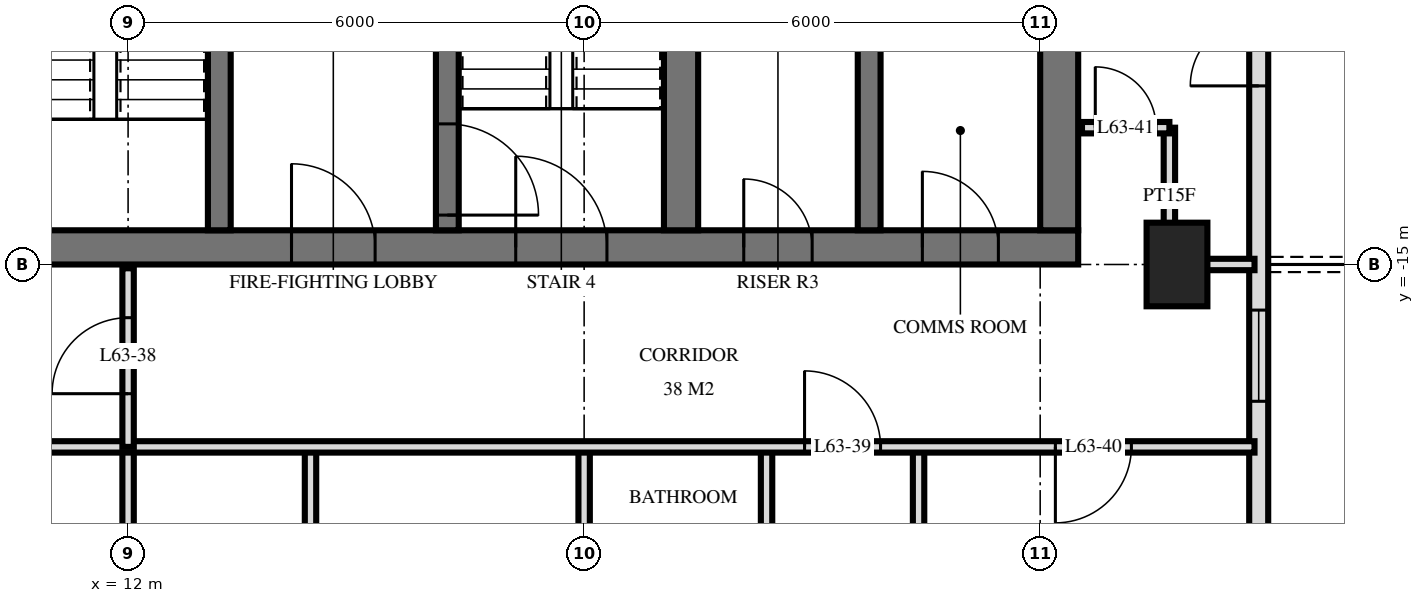
"""IFC4 building model, lengths in metres.
Left out: names, types, materials, properties, quantities, classifications, styles, units other than length and angle.
Written with IfcOpenShell. Run it as: python <this file> out.ifc"""

import sys

from ifc_helpers import new_model, si_unit, direction, frame, frame_2d, origin, origin_2d, place, context, subcontext, project, spatial, rectangle, extrude, element, fill, save


model = new_model("IFC4")
c1 = context("Model", 3, precision=1e-05, world=origin(), true_north=direction((0.0, 1.0)))
c2 = subcontext(c1, "Body", "Model", "MODEL_VIEW")
j1 = project(units=[si_unit("LENGTHUNIT", "METRE"), si_unit("PLANEANGLEUNIT", "RADIAN")], contexts=[c1])
p1 = place(None, origin())
s1 = spatial("IfcSite", under=j1, at=p1, CompositionType="ELEMENT")
p2 = place(p1, origin())
s2 = spatial("IfcBuilding", under=s1, at=p2, CompositionType="ELEMENT")
p3 = place(p2, frame((0.0, 0.0, 239.6)))
s3 = spatial("IfcBuildingStorey", under=s2, at=p3, CompositionType="ELEMENT", Elevation=239.6)
p4 = place(p3, frame((25.8, -15.0, 0.0), z_axis=(0.0, 0.0, 1.0), x_axis=(0.0, 1.0, 0.0)))
e1 = element("IfcColumn", 1, at=p4, inside=s3, PredefinedType="COLUMN", context=c2, shape_type="SweptSolid", body=[
    extrude(rectangle(XDim=1.1, YDim=0.8, at=origin_2d()), origin(), (0.0, 0.0, 1.0), 3.5),
])
p5 = place(p3, frame((10.0, -14.775, 0.0), z_axis=(0.0, 0.0, 1.0), x_axis=(1.0, 0.0, 0.0)))
e2 = element("IfcWall", 2, at=p5, inside=s3, PredefinedType="SHEAR", context=c2, shape_type="SweptSolid", body=[
    extrude(rectangle(XDim=14.5, YDim=0.45, at=frame_2d((7.25, 0.0))), origin(), (0.0, 0.0, 1.0), 3.5),
])
p6 = place(p5, frame((7.1, 0.0, 0.0)))
e3 = element("IfcOpeningElement", 3, at=p6, cuts=e2, PredefinedType="OPENING", context=c2, shape_type="SweptSolid", body=[
    extrude(rectangle(XDim=1.2, YDim=2.1, at=frame_2d((0.6, 1.05))), frame((0.0, 0.235, 0.0), z_axis=(0.0, -1.0, 0.0), x_axis=(1.0, 0.0, 0.0)), (0.0, 0.0, 1.0), 0.47),
])
p7 = place(p5, frame((4.15, 0.0, 0.0)))
e4 = element("IfcOpeningElement", 4, at=p7, cuts=e2, PredefinedType="OPENING", context=c2, shape_type="SweptSolid", body=[
    extrude(rectangle(XDim=1.1, YDim=2.1, at=frame_2d((0.55, 1.05))), frame((0.0, 0.235, 0.0), z_axis=(0.0, -1.0, 0.0), x_axis=(1.0, 0.0, 0.0)), (0.0, 0.0, 1.0), 0.47),
])
p8 = place(p5, frame((10.1, 0.0, 0.0)))
e5 = element("IfcOpeningElement", 5, at=p8, cuts=e2, PredefinedType="OPENING", context=c2, shape_type="SweptSolid", body=[
    extrude(rectangle(XDim=0.9, YDim=2.1, at=frame_2d((0.45, 1.05))), frame((0.0, 0.235, 0.0), z_axis=(0.0, -1.0, 0.0), x_axis=(1.0, 0.0, 0.0)), (0.0, 0.0, 1.0), 0.47),
])
p9 = place(p5, frame((12.45, 0.0, 0.0)))
e6 = element("IfcOpeningElement", 6, at=p9, cuts=e2, PredefinedType="OPENING", context=c2, shape_type="SweptSolid", body=[
    extrude(rectangle(XDim=1.0, YDim=2.1, at=frame_2d((0.5, 1.05))), frame((0.0, 0.235, 0.0), z_axis=(0.0, -1.0, 0.0), x_axis=(1.0, 0.0, 0.0)), (0.0, 0.0, 1.0), 0.47),
])
p10 = place(p3, frame((24.25, -14.55, 0.0), z_axis=(0.0, 0.0, 1.0), x_axis=(0.0, 1.0, 0.0)))
e7 = element("IfcWall", 7, at=p10, inside=s3, PredefinedType="SHEAR", context=c2, shape_type="SweptSolid", body=[
    extrude(rectangle(XDim=14.1, YDim=0.5, at=frame_2d((7.05, 0.0))), origin(), (0.0, 0.0, 1.0), 3.5),
])
p11 = place(p3, frame((13.2, -14.55, 0.0), z_axis=(0.0, 0.0, 1.0), x_axis=(0.0, 1.0, 0.0)))
e8 = element("IfcWall", 8, at=p11, inside=s3, PredefinedType="SHEAR", context=c2, shape_type="SweptSolid", body=[
    extrude(rectangle(XDim=5.4, YDim=0.3, at=frame_2d((2.7, 0.0))), origin(), (0.0, 0.0, 1.0), 3.5),
])
p12 = place(p11, frame((4.0, 0.0, 0.0)))
e9 = element("IfcOpeningElement", 9, at=p12, cuts=e8, PredefinedType="OPENING", context=c2, shape_type="SweptSolid", body=[
    extrude(rectangle(XDim=1.2, YDim=2.1, at=frame_2d((0.6, 1.05))), frame((0.0, 0.16, 0.0), z_axis=(0.0, -1.0, 0.0), x_axis=(1.0, 0.0, 0.0)), (0.0, 0.0, 1.0), 0.32),
])
p13 = place(p3, frame((16.2, -14.55, 0.0), z_axis=(0.0, 0.0, 1.0), x_axis=(0.0, 1.0, 0.0)))
e10 = element("IfcWall", 10, at=p13, inside=s3, PredefinedType="SHEAR", context=c2, shape_type="SweptSolid", body=[
    extrude(rectangle(XDim=5.4, YDim=0.3, at=frame_2d((2.7, 0.0))), origin(), (0.0, 0.0, 1.0), 3.5),
])
p14 = place(p13, frame((0.2, 0.0, 0.0)))
e11 = element("IfcOpeningElement", 11, at=p14, cuts=e10, PredefinedType="OPENING", context=c2, shape_type="SweptSolid", body=[
    extrude(rectangle(XDim=1.2, YDim=2.1, at=frame_2d((0.6, 1.05))), frame((0.0, 0.16, 0.0), z_axis=(0.0, -1.0, 0.0), x_axis=(1.0, 0.0, 0.0)), (0.0, 0.0, 1.0), 0.32),
])
p15 = place(p3, frame((19.275, -14.55, 0.0), z_axis=(0.0, 0.0, 1.0), x_axis=(0.0, 1.0, 0.0)))
e12 = element("IfcWall", 12, at=p15, inside=s3, PredefinedType="SHEAR", context=c2, shape_type="SweptSolid", body=[
    extrude(rectangle(XDim=5.4, YDim=0.45, at=frame_2d((2.7, 0.0))), origin(), (0.0, 0.0, 1.0), 3.5),
])
p16 = place(p3, frame((21.75, -14.55, 0.0), z_axis=(0.0, 0.0, 1.0), x_axis=(0.0, 1.0, 0.0)))
e13 = element("IfcWall", 13, at=p16, inside=s3, PredefinedType="SHEAR", context=c2, shape_type="SweptSolid", body=[
    extrude(rectangle(XDim=5.4, YDim=0.3, at=frame_2d((2.7, 0.0))), origin(), (0.0, 0.0, 1.0), 3.5),
])
p17 = place(p3, frame((26.875, -24.875, 0.0), z_axis=(0.0, 0.0, 1.0), x_axis=(0.0, 1.0, 0.0)))
e14 = element("IfcWall", 14, at=p17, inside=s3, PredefinedType="SOLIDWALL", context=c2, shape_type="SweptSolid", body=[
    extrude(rectangle(XDim=21.551, YDim=0.25, at=frame_2d((10.775, 0.0))), origin(), (0.0, 0.0, 1.0), 3.22),
])
p18 = place(p17, frame((0.575, 0.0, 0.0)))
e15 = element("IfcOpeningElement", 15, at=p18, cuts=e14, PredefinedType="OPENING", context=c2, shape_type="SweptSolid", body=[
    extrude(rectangle(XDim=1.8, YDim=2.4, at=frame_2d((0.9, 1.2))), frame((0.0, 0.135, 0.0), z_axis=(0.0, -1.0, 0.0), x_axis=(1.0, 0.0, 0.0)), (0.0, 0.0, 1.0), 0.27),
])
p19 = place(p17, frame((4.475, 0.0, 0.0)))
e16 = element("IfcOpeningElement", 16, at=p19, cuts=e14, PredefinedType="OPENING", context=c2, shape_type="SweptSolid", body=[
    extrude(rectangle(XDim=1.8, YDim=2.4, at=frame_2d((0.9, 1.2))), frame((0.0, 0.135, 0.0), z_axis=(0.0, -1.0, 0.0), x_axis=(1.0, 0.0, 0.0)), (0.0, 0.0, 1.0), 0.27),
])
p20 = place(p17, frame((8.075, 0.0, 0.9)))
e17 = element("IfcOpeningElement", 17, at=p20, cuts=e14, PredefinedType="OPENING", context=c2, shape_type="SweptSolid", body=[
    extrude(rectangle(XDim=1.2, YDim=1.5, at=frame_2d((0.6, 0.75))), frame((0.0, 0.135, 0.0), z_axis=(0.0, -1.0, 0.0), x_axis=(1.0, 0.0, 0.0)), (0.0, 0.0, 1.0), 0.27),
])
p21 = place(p17, frame((12.225, 0.0, 0.0)))
e18 = element("IfcOpeningElement", 18, at=p21, cuts=e14, PredefinedType="OPENING", context=c2, shape_type="SweptSolid", body=[
    extrude(rectangle(XDim=1.8, YDim=2.4, at=frame_2d((0.9, 1.2))), frame((0.0, 0.135, 0.0), z_axis=(0.0, -1.0, 0.0), x_axis=(1.0, 0.0, 0.0)), (0.0, 0.0, 1.0), 0.27),
])
p22 = place(p3, frame((25.7, -15.0, 0.0), z_axis=(0.0, 0.0, 1.0), x_axis=(0.0, 1.0, 0.0)))
e19 = element("IfcWall", 19, at=p22, inside=s3, PredefinedType="PARTITIONING", context=c2, shape_type="SweptSolid", body=[
    extrude(rectangle(XDim=1.8, YDim=0.15, at=frame_2d((0.9, 0.0))), origin(), (0.0, 0.0, 1.0), 3.22),
])
p23 = place(p3, frame((22.4, -21.6, 0.0), z_axis=(0.0, 0.0, 1.0), x_axis=(0.0, 1.0, 0.0)))
e20 = element("IfcWall", 20, at=p23, inside=s3, PredefinedType="PARTITIONING", context=c2, shape_type="SweptSolid", body=[
    extrude(rectangle(XDim=4.2, YDim=0.15, at=frame_2d((2.1, 0.0))), origin(), (0.0, 0.0, 1.0), 3.22),
])
p24 = place(p3, frame((20.4, -21.6, 0.0), z_axis=(0.0, 0.0, 1.0), x_axis=(0.0, 1.0, 0.0)))
e21 = element("IfcWall", 21, at=p24, inside=s3, PredefinedType="PARTITIONING", context=c2, shape_type="SweptSolid", body=[
    extrude(rectangle(XDim=4.2, YDim=0.15, at=frame_2d((2.1, 0.0))), origin(), (0.0, 0.0, 1.0), 3.22),
])
p25 = place(p24, frame((1.6, 0.0, 0.0)))
e22 = element("IfcOpeningElement", 22, at=p25, cuts=e21, PredefinedType="OPENING", context=c2, shape_type="SweptSolid", body=[
    extrude(rectangle(XDim=1.0, YDim=2.1, at=frame_2d((0.5, 1.05))), frame((0.0, 0.085, 0.0), z_axis=(0.0, -1.0, 0.0), x_axis=(1.0, 0.0, 0.0)), (0.0, 0.0, 1.0), 0.17),
])
for number, where, z_axis, x_axis in (
    (23, (18.0, -21.6, 0.0), (0.0, 0.0, 1.0), (0.0, 1.0, 0.0)),
    (24, (14.4, -21.6, 0.0), (0.0, 0.0, 1.0), (0.0, 1.0, 0.0)),
):
    element("IfcWall", number, at=place(p3, frame(where, z_axis=z_axis, x_axis=x_axis)), inside=s3, PredefinedType="PARTITIONING", context=c2, shape_type="SweptSolid", body=[
        extrude(rectangle(XDim=4.2, YDim=0.15, at=frame_2d((2.1, 0.0))), origin(), (0.0, 0.0, 1.0), 3.22),
    ])
p26 = place(p3, frame((12.0, -17.4, 0.0), z_axis=(0.0, 0.0, 1.0), x_axis=(0.0, 1.0, 0.0)))
e25 = element("IfcWall", 25, at=p26, inside=s3, PredefinedType="PARTITIONING", context=c2, shape_type="SweptSolid", body=[
    extrude(rectangle(XDim=2.35, YDim=0.15, at=frame_2d((1.175, 0.0))), origin(), (0.0, 0.0, 1.0), 3.22),
])
p27 = place(p26, frame((0.7, 0.0, 0.0)))
e26 = element("IfcOpeningElement", 26, at=p27, cuts=e25, PredefinedType="OPENING", context=c2, shape_type="SweptSolid", body=[
    extrude(rectangle(XDim=1.0, YDim=2.1, at=frame_2d((0.5, 1.05))), frame((0.0, 0.085, 0.0), z_axis=(0.0, -1.0, 0.0), x_axis=(1.0, 0.0, 0.0)), (0.0, 0.0, 1.0), 0.17),
])
p28 = place(p3, frame((12.0, -29.22, 0.0), z_axis=(0.0, 0.0, 1.0), x_axis=(0.0, 1.0, 0.0)))
e27 = element("IfcWall", 27, at=p28, inside=s3, PredefinedType="PARTITIONING", context=c2, shape_type="SweptSolid", body=[
    extrude(rectangle(XDim=11.82, YDim=0.15, at=frame_2d((5.91, 0.0))), origin(), (0.0, 0.0, 1.0), 3.22),
])
p29 = place(p3, frame((-26.82, -17.4, 0.0), z_axis=(0.0, 0.0, 1.0), x_axis=(1.0, 0.0, 0.0)))
e28 = element("IfcWall", 28, at=p29, inside=s3, PredefinedType="PARTITIONING", context=c2, shape_type="SweptSolid", body=[
    extrude(rectangle(XDim=53.64, YDim=0.15, at=frame_2d((26.82, 0.0))), origin(), (0.0, 0.0, 1.0), 3.22),
])
p30 = place(p29, frame((11.97, 0.0, 0.0)))
e29 = element("IfcOpeningElement", 29, at=p30, cuts=e28, PredefinedType="OPENING", context=c2, shape_type="SweptSolid", body=[
    extrude(rectangle(XDim=1.0, YDim=2.1, at=frame_2d((0.5, 1.05))), frame((0.0, 0.085, 0.0), z_axis=(0.0, -1.0, 0.0), x_axis=(1.0, 0.0, 0.0)), (0.0, 0.0, 1.0), 0.17),
])
p31 = place(p29, frame((3.92, 0.0, 0.0)))
e30 = element("IfcOpeningElement", 30, at=p31, cuts=e28, PredefinedType="OPENING", context=c2, shape_type="SweptSolid", body=[
    extrude(rectangle(XDim=1.0, YDim=2.1, at=frame_2d((0.5, 1.05))), frame((0.0, 0.085, 0.0), z_axis=(0.0, -1.0, 0.0), x_axis=(1.0, 0.0, 0.0)), (0.0, 0.0, 1.0), 0.17),
])
p32 = place(p29, frame((5.72, 0.0, 0.0)))
e31 = element("IfcOpeningElement", 31, at=p32, cuts=e28, PredefinedType="OPENING", context=c2, shape_type="SweptSolid", body=[
    extrude(rectangle(XDim=1.0, YDim=2.1, at=frame_2d((0.5, 1.05))), frame((0.0, 0.085, 0.0), z_axis=(0.0, -1.0, 0.0), x_axis=(1.0, 0.0, 0.0)), (0.0, 0.0, 1.0), 0.17),
])
p33 = place(p29, frame((47.72, 0.0, 0.0)))
e32 = element("IfcOpeningElement", 32, at=p33, cuts=e28, PredefinedType="OPENING", context=c2, shape_type="SweptSolid", body=[
    extrude(rectangle(XDim=1.0, YDim=2.1, at=frame_2d((0.5, 1.05))), frame((0.0, 0.085, 0.0), z_axis=(0.0, -1.0, 0.0), x_axis=(1.0, 0.0, 0.0)), (0.0, 0.0, 1.0), 0.17),
])
p34 = place(p29, frame((51.02, 0.0, 0.0)))
e33 = element("IfcOpeningElement", 33, at=p34, cuts=e28, PredefinedType="OPENING", context=c2, shape_type="SweptSolid", body=[
    extrude(rectangle(XDim=1.0, YDim=2.1, at=frame_2d((0.5, 1.05))), frame((0.0, 0.085, 0.0), z_axis=(0.0, -1.0, 0.0), x_axis=(1.0, 0.0, 0.0)), (0.0, 0.0, 1.0), 0.17),
])
p35 = place(p29, frame((17.32, 0.0, 0.0)))
e34 = element("IfcOpeningElement", 34, at=p35, cuts=e28, PredefinedType="OPENING", context=c2, shape_type="SweptSolid", body=[
    extrude(rectangle(XDim=1.0, YDim=2.1, at=frame_2d((0.5, 1.05))), frame((0.0, 0.085, 0.0), z_axis=(0.0, -1.0, 0.0), x_axis=(1.0, 0.0, 0.0)), (0.0, 0.0, 1.0), 0.17),
])
p36 = place(p29, frame((23.32, 0.0, 0.0)))
e35 = element("IfcOpeningElement", 35, at=p36, cuts=e28, PredefinedType="OPENING", context=c2, shape_type="SweptSolid", body=[
    extrude(rectangle(XDim=1.0, YDim=2.1, at=frame_2d((0.5, 1.05))), frame((0.0, 0.085, 0.0), z_axis=(0.0, -1.0, 0.0), x_axis=(1.0, 0.0, 0.0)), (0.0, 0.0, 1.0), 0.17),
])
p37 = place(p29, frame((29.32, 0.0, 0.0)))
e36 = element("IfcOpeningElement", 36, at=p37, cuts=e28, PredefinedType="OPENING", context=c2, shape_type="SweptSolid", body=[
    extrude(rectangle(XDim=1.0, YDim=2.1, at=frame_2d((0.5, 1.05))), frame((0.0, 0.085, 0.0), z_axis=(0.0, -1.0, 0.0), x_axis=(1.0, 0.0, 0.0)), (0.0, 0.0, 1.0), 0.17),
])
p38 = place(p29, frame((35.32, 0.0, 0.0)))
e37 = element("IfcOpeningElement", 37, at=p38, cuts=e28, PredefinedType="OPENING", context=c2, shape_type="SweptSolid", body=[
    extrude(rectangle(XDim=1.0, YDim=2.1, at=frame_2d((0.5, 1.05))), frame((0.0, 0.085, 0.0), z_axis=(0.0, -1.0, 0.0), x_axis=(1.0, 0.0, 0.0)), (0.0, 0.0, 1.0), 0.17),
])
p39 = place(p3, frame((25.7, -15.0, 0.0), z_axis=(0.0, 0.0, 1.0), x_axis=(1.0, 0.0, 0.0)))
e38 = element("IfcWall", 38, at=p39, inside=s3, PredefinedType="PARTITIONING", context=c2, shape_type="SweptSolid", body=[
    extrude(rectangle(XDim=1.12, YDim=0.15, at=frame_2d((0.56, 0.0))), origin(), (0.0, 0.0, 1.0), 3.22),
])
p40 = place(p3, frame((24.55, -13.2, 0.0), z_axis=(0.0, 0.0, 1.0), x_axis=(1.0, 0.0, 0.0)))
e39 = element("IfcWall", 39, at=p40, inside=s3, PredefinedType="PARTITIONING", context=c2, shape_type="SweptSolid", body=[
    extrude(rectangle(XDim=1.15, YDim=0.15, at=frame_2d((0.575, 0.0))), origin(), (0.0, 0.0, 1.0), 3.22),
])
p41 = place(p40, frame((0.175, 0.0, 0.0)))
e40 = element("IfcOpeningElement", 40, at=p41, cuts=e39, PredefinedType="OPENING", context=c2, shape_type="SweptSolid", body=[
    extrude(rectangle(XDim=0.8, YDim=2.1, at=frame_2d((0.4, 1.05))), frame((0.0, 0.085, 0.0), z_axis=(0.0, -1.0, 0.0), x_axis=(1.0, 0.0, 0.0)), (0.0, 0.0, 1.0), 0.17),
])
p42 = place(p20, origin())
e41 = element("IfcWindow", 41, at=p42, inside=s3, PartitioningType="SINGLE_PANEL", PredefinedType="WINDOW", context=c2, shape_type="SweptSolid", body=[
    extrude(rectangle(XDim=1.2, YDim=1.5, at=frame_2d((0.6, 0.75))), frame((0.0, 0.03, 0.0), z_axis=(0.0, -1.0, 0.0), x_axis=(1.0, 0.0, 0.0)), (0.0, 0.0, 1.0), 0.06),
])
fill(e17, e41)
p43 = place(p21, origin())
e42 = element("IfcDoor", 42, at=p43, inside=s3, OperationType="DOUBLE_DOOR_SINGLE_SWING", PredefinedType="DOOR", context=c2, shape_type="SweptSolid", body=[
    extrude(rectangle(XDim=1.8, YDim=2.4, at=frame_2d((0.9, 1.2))), frame((0.0, 0.025, 0.0), z_axis=(0.0, -1.0, 0.0), x_axis=(1.0, 0.0, 0.0)), (0.0, 0.0, 1.0), 0.05),
])
fill(e18, e42)
p44 = place(p6, origin())
e43 = element("IfcDoor", 43, at=p44, inside=s3, OperationType="SINGLE_SWING_RIGHT", PredefinedType="DOOR", context=c2, shape_type="SweptSolid", body=[
    extrude(rectangle(XDim=1.2, YDim=2.1, at=frame_2d((0.6, 1.05))), frame((0.0, 0.025, 0.0), z_axis=(0.0, -1.0, 0.0), x_axis=(1.0, 0.0, 0.0)), (0.0, 0.0, 1.0), 0.05),
])
fill(e3, e43)
p45 = place(p7, origin())
e44 = element("IfcDoor", 44, at=p45, inside=s3, OperationType="SINGLE_SWING_RIGHT", PredefinedType="DOOR", context=c2, shape_type="SweptSolid", body=[
    extrude(rectangle(XDim=1.1, YDim=2.1, at=frame_2d((0.55, 1.05))), frame((0.0, 0.025, 0.0), z_axis=(0.0, -1.0, 0.0), x_axis=(1.0, 0.0, 0.0)), (0.0, 0.0, 1.0), 0.05),
])
fill(e4, e44)
p46 = place(p8, origin())
e45 = element("IfcDoor", 45, at=p46, inside=s3, OperationType="SINGLE_SWING_RIGHT", PredefinedType="DOOR", context=c2, shape_type="SweptSolid", body=[
    extrude(rectangle(XDim=0.9, YDim=2.1, at=frame_2d((0.45, 1.05))), frame((0.0, 0.025, 0.0), z_axis=(0.0, -1.0, 0.0), x_axis=(1.0, 0.0, 0.0)), (0.0, 0.0, 1.0), 0.05),
])
fill(e5, e45)
p47 = place(p9, origin())
e46 = element("IfcDoor", 46, at=p47, inside=s3, OperationType="SINGLE_SWING_RIGHT", PredefinedType="DOOR", context=c2, shape_type="SweptSolid", body=[
    extrude(rectangle(XDim=1.0, YDim=2.1, at=frame_2d((0.5, 1.05))), frame((0.0, 0.025, 0.0), z_axis=(0.0, -1.0, 0.0), x_axis=(1.0, 0.0, 0.0)), (0.0, 0.0, 1.0), 0.05),
])
fill(e6, e46)
p48 = place(p14, frame((0.6, 0.0, 0.0), z_axis=(0.0, 0.0, 1.0), x_axis=(-1.0, 0.0, 0.0)))
e47 = element("IfcDoor", 47, at=p48, inside=s3, OperationType="SINGLE_SWING_LEFT", PredefinedType="DOOR", context=c2, shape_type="SweptSolid", body=[
    extrude(rectangle(XDim=1.2, YDim=2.1, at=frame_2d((0.0, 1.05))), frame((0.0, -0.025, 0.0), z_axis=(0.0, 1.0, 0.0), x_axis=(-1.0, 0.0, 0.0)), (0.0, 0.0, 1.0), 0.05),
])
fill(e11, e47)
p49 = place(p27, origin())
e48 = element("IfcDoor", 48, at=p49, inside=s3, OperationType="SINGLE_SWING_RIGHT", PredefinedType="DOOR", context=c2, shape_type="SweptSolid", body=[
    extrude(rectangle(XDim=1.0, YDim=2.1, at=frame_2d((0.5, 1.05))), frame((0.0, 0.025, 0.0), z_axis=(0.0, -1.0, 0.0), x_axis=(1.0, 0.0, 0.0)), (0.0, 0.0, 1.0), 0.05),
])
fill(e26, e48)
p50 = place(p33, origin())
e49 = element("IfcDoor", 49, at=p50, inside=s3, OperationType="SINGLE_SWING_RIGHT", PredefinedType="DOOR", context=c2, shape_type="SweptSolid", body=[
    extrude(rectangle(XDim=1.0, YDim=2.1, at=frame_2d((0.5, 1.05))), frame((0.0, 0.025, 0.0), z_axis=(0.0, -1.0, 0.0), x_axis=(1.0, 0.0, 0.0)), (0.0, 0.0, 1.0), 0.05),
])
fill(e32, e49)
p51 = place(p34, frame((0.5, 0.0, 0.0), z_axis=(0.0, 0.0, 1.0), x_axis=(-1.0, 0.0, 0.0)))
e50 = element("IfcDoor", 50, at=p51, inside=s3, OperationType="SINGLE_SWING_LEFT", PredefinedType="DOOR", context=c2, shape_type="SweptSolid", body=[
    extrude(rectangle(XDim=1.0, YDim=2.1, at=frame_2d((0.0, 1.05))), frame((0.0, -0.025, 0.0), z_axis=(0.0, 1.0, 0.0), x_axis=(-1.0, 0.0, 0.0)), (0.0, 0.0, 1.0), 0.05),
])
fill(e33, e50)
p52 = place(p41, origin())
e51 = element("IfcDoor", 51, at=p52, inside=s3, OperationType="SINGLE_SWING_RIGHT", PredefinedType="DOOR", context=c2, shape_type="SweptSolid", body=[
    extrude(rectangle(XDim=0.8, YDim=2.1, at=frame_2d((0.4, 1.05))), frame((0.0, 0.025, 0.0), z_axis=(0.0, -1.0, 0.0), x_axis=(1.0, 0.0, 0.0)), (0.0, 0.0, 1.0), 0.05),
])
fill(e40, e51)
save(model, sys.argv[1])
